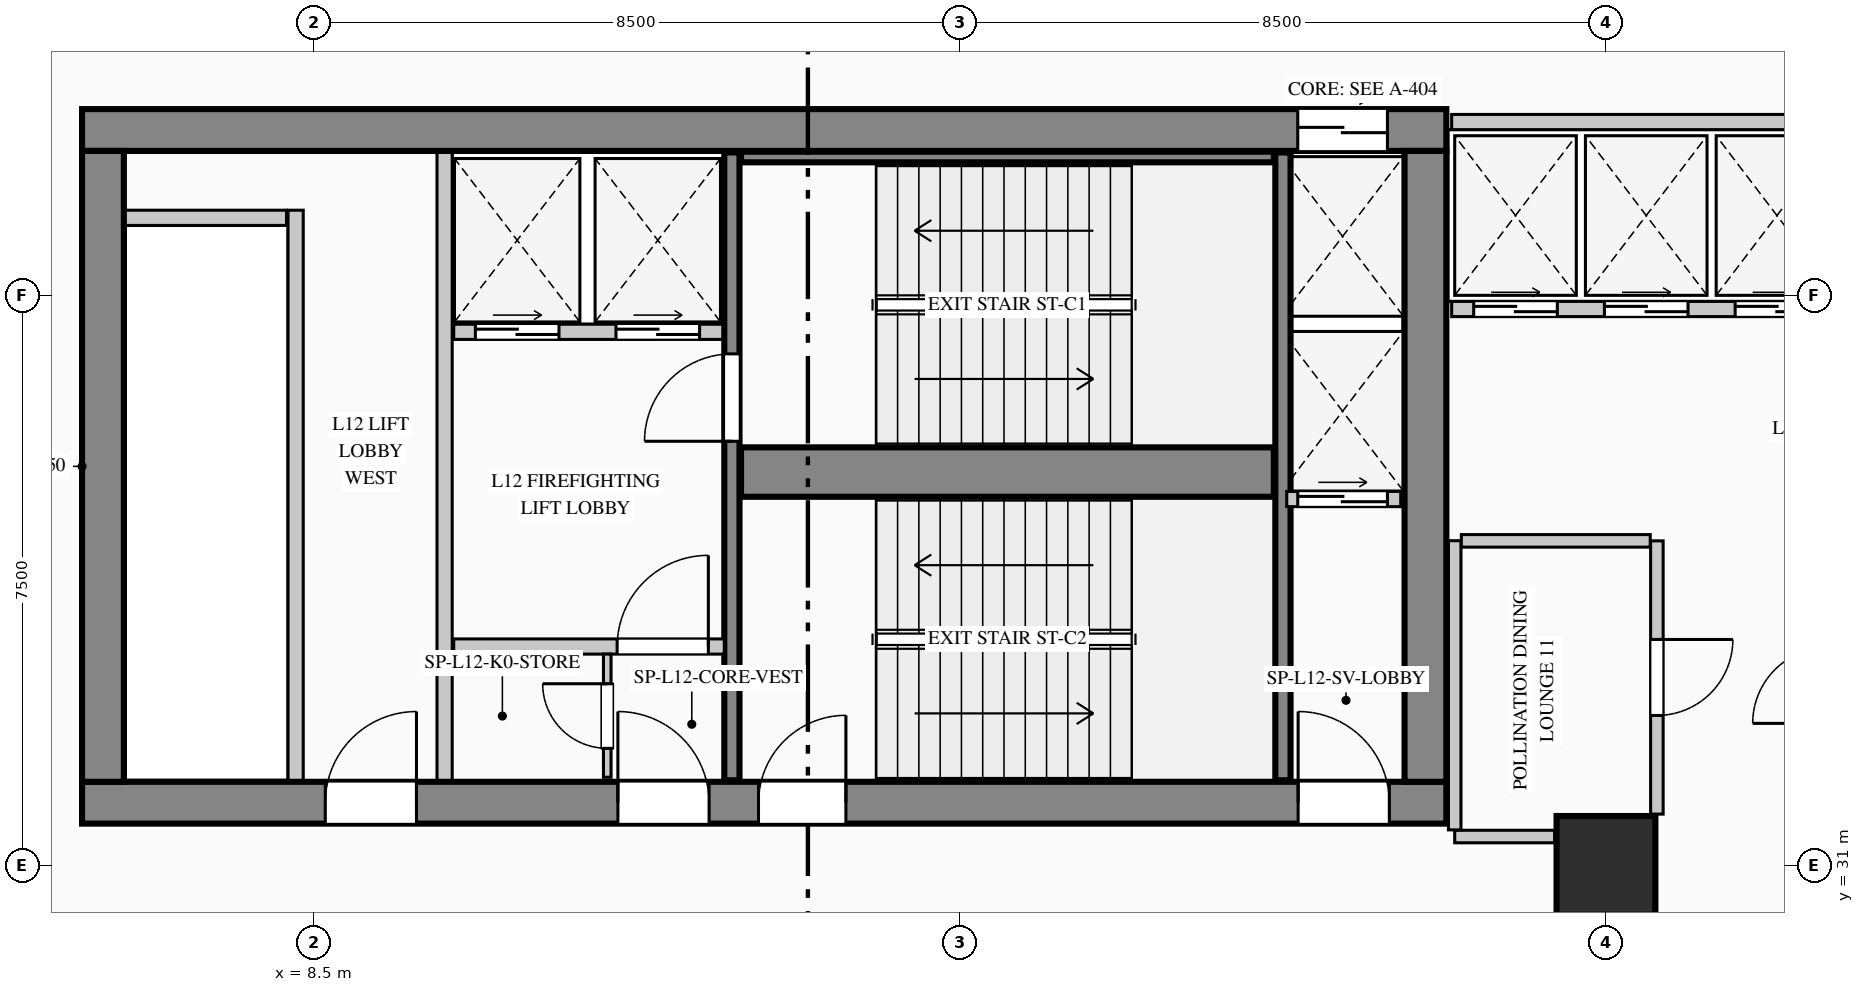
"""IFC4 building model, lengths in metres.
Left out: names, types, materials, properties, quantities, classifications, styles, units other than length and angle.
Written with IfcOpenShell. Run it as: python <this file> out.ifc"""

import sys

from ifc_helpers import new_model, si_unit, direction, frame, frame_2d, origin, origin_2d, place, context, subcontext, project, spatial, rectangle, extrude, element, fill, save


model = new_model("IFC4")
c1 = context("Model", 3, precision=1e-05, world=origin(), true_north=direction((0.0, 1.0)))
c2 = subcontext(c1, "Body", "Model", "MODEL_VIEW")
j1 = project(units=[si_unit("LENGTHUNIT", "METRE"), si_unit("PLANEANGLEUNIT", "RADIAN")], contexts=[c1])
p1 = place(None, origin())
s1 = spatial("IfcSite", under=j1, at=p1, CompositionType="ELEMENT")
p2 = place(p1, origin())
s2 = spatial("IfcBuilding", under=s1, at=p2, CompositionType="ELEMENT")
p3 = place(p2, frame((0.0, 0.0, 53.4)))
s3 = spatial("IfcBuildingStorey", under=s2, at=p3, CompositionType="ELEMENT", Elevation=53.4)
p4 = place(p3, frame((5.45, 40.675, 0.0), z_axis=(0.0, 0.0, 1.0), x_axis=(1.0, 0.0, 0.0)))
e1 = element("IfcWall", 1, at=p4, inside=s3, PredefinedType="SHEAR", context=c2, shape_type="SweptSolid", body=[
    extrude(rectangle(XDim=17.95, YDim=0.55, at=frame_2d((8.975, 0.0))), origin(), (0.0, 0.0, 1.0), 4.4),
])
p5 = place(p4, frame((15.995, 0.0, 0.0)))
e2 = element("IfcOpeningElement", 2, at=p5, cuts=e1, PredefinedType="OPENING", context=c2, shape_type="SweptSolid", body=[
    extrude(rectangle(XDim=1.18, YDim=2.25, at=frame_2d((0.59, 1.125))), frame((0.0, 0.285, 0.0), z_axis=(0.0, -1.0, 0.0), x_axis=(1.0, 0.0, 0.0)), (0.0, 0.0, 1.0), 0.57),
])
p6 = place(p3, frame((5.45, 31.825, 0.0), z_axis=(0.0, 0.0, 1.0), x_axis=(1.0, 0.0, 0.0)))
e3 = element("IfcWall", 3, at=p6, inside=s3, PredefinedType="SHEAR", context=c2, shape_type="SweptSolid", body=[
    extrude(rectangle(XDim=17.95, YDim=0.55, at=frame_2d((8.975, 0.0))), origin(), (0.0, 0.0, 1.0), 4.4),
])
p7 = place(p6, frame((3.2, 0.0, 0.0)))
e4 = element("IfcOpeningElement", 4, at=p7, cuts=e3, PredefinedType="OPENING", context=c2, shape_type="SweptSolid", body=[
    extrude(rectangle(XDim=1.2, YDim=2.2, at=frame_2d((0.6, 1.1))), frame((0.0, 0.285, 0.0), z_axis=(0.0, -1.0, 0.0), x_axis=(1.0, 0.0, 0.0)), (0.0, 0.0, 1.0), 0.57),
])
p8 = place(p6, frame((7.05, 0.0, 0.0)))
e5 = element("IfcOpeningElement", 5, at=p8, cuts=e3, PredefinedType="OPENING", context=c2, shape_type="SweptSolid", body=[
    extrude(rectangle(XDim=1.2, YDim=2.2, at=frame_2d((0.6, 1.1))), frame((0.0, 0.285, 0.0), z_axis=(0.0, -1.0, 0.0), x_axis=(1.0, 0.0, 0.0)), (0.0, 0.0, 1.0), 0.57),
])
p9 = place(p6, frame((8.9, 0.0, 0.0)))
e6 = element("IfcOpeningElement", 6, at=p9, cuts=e3, PredefinedType="OPENING", context=c2, shape_type="SweptSolid", body=[
    extrude(rectangle(XDim=1.15, YDim=2.2, at=frame_2d((0.575, 1.1))), frame((0.0, 0.285, 0.0), z_axis=(0.0, -1.0, 0.0), x_axis=(1.0, 0.0, 0.0)), (0.0, 0.0, 1.0), 0.57),
])
p10 = place(p6, frame((16.0, 0.0, 0.0)))
e7 = element("IfcOpeningElement", 7, at=p10, cuts=e3, PredefinedType="OPENING", context=c2, shape_type="SweptSolid", body=[
    extrude(rectangle(XDim=1.2, YDim=2.2, at=frame_2d((0.6, 1.1))), frame((0.0, 0.285, 0.0), z_axis=(0.0, -1.0, 0.0), x_axis=(1.0, 0.0, 0.0)), (0.0, 0.0, 1.0), 0.57),
])
for number, where, z_axis, x_axis in (
    (8, (5.725, 32.1, 0.0), (0.0, 0.0, 1.0), (0.0, 1.0, 0.0)),
    (9, (23.125, 32.1, 0.0), (0.0, 0.0, 1.0), (0.0, 1.0, 0.0)),
):
    element("IfcWall", number, at=place(p3, frame(where, z_axis=z_axis, x_axis=x_axis)), inside=s3, PredefinedType="SHEAR", context=c2, shape_type="SweptSolid", body=[
        extrude(rectangle(XDim=8.3, YDim=0.55, at=frame_2d((4.15, 0.0))), origin(), (0.0, 0.0, 1.0), 4.4),
    ])
p11 = place(p3, frame((14.0, 32.12, 0.0), z_axis=(0.0, 0.0, 1.0), x_axis=(0.0, 1.0, 0.0)))
e10 = element("IfcWall", 10, at=p11, inside=s3, PredefinedType="SHEAR", context=c2, shape_type="SweptSolid", body=[
    extrude(rectangle(XDim=8.26, YDim=0.2, at=frame_2d((4.13, 0.0))), origin(), (0.0, 0.0, 1.0), 4.4),
])
p12 = place(p11, frame((4.46, 0.0, 0.0)))
e11 = element("IfcOpeningElement", 11, at=p12, cuts=e10, PredefinedType="OPENING", context=c2, shape_type="SweptSolid", body=[
    extrude(rectangle(XDim=1.15, YDim=2.2, at=frame_2d((0.575, 1.1))), frame((0.0, 0.11, 0.0), z_axis=(0.0, -1.0, 0.0), x_axis=(1.0, 0.0, 0.0)), (0.0, 0.0, 1.0), 0.22),
])
p13 = place(p3, frame((14.12, 36.175, 0.0), z_axis=(0.0, 0.0, 1.0), x_axis=(1.0, 0.0, 0.0)))
e12 = element("IfcWall", 12, at=p13, inside=s3, PredefinedType="SHEAR", context=c2, shape_type="SweptSolid", body=[
    extrude(rectangle(XDim=7.01, YDim=0.65, at=frame_2d((3.505, 0.0))), origin(), (0.0, 0.0, 1.0), 4.4),
])
p14 = place(p3, frame((21.25, 32.12, 0.0), z_axis=(0.0, 0.0, 1.0), x_axis=(0.0, 1.0, 0.0)))
e13 = element("IfcWall", 13, at=p14, inside=s3, PredefinedType="SHEAR", context=c2, shape_type="SweptSolid", body=[
    extrude(rectangle(XDim=8.26, YDim=0.2, at=frame_2d((4.13, 0.0))), origin(), (0.0, 0.0, 1.0), 4.4),
])
p15 = place(p3, frame((14.12, 40.32, 0.0), z_axis=(0.0, 0.0, 1.0), x_axis=(1.0, 0.0, 0.0)))
e14 = element("IfcWall", 14, at=p15, inside=s3, PredefinedType="SHEAR", context=c2, shape_type="SweptSolid", body=[
    extrude(rectangle(XDim=7.01, YDim=0.14, at=frame_2d((3.505, 0.0))), origin(), (0.0, 0.0, 1.0), 4.4),
])
p16 = place(p3, frame((25.5, 31.0, 0.0), z_axis=(0.0, 0.0, 1.0), x_axis=(1.0, 0.0, 0.0)))
e15 = element("IfcColumn", 15, at=p16, inside=s3, PredefinedType="COLUMN", context=c2, shape_type="SweptSolid", body=[
    extrude(rectangle(XDim=1.3, YDim=1.3, at=origin_2d()), origin(), (0.0, 0.0, 1.0), 4.4),
])
p17 = place(p3, frame((8.523, 4.84, 0.0), z_axis=(0.0, 0.0, 1.0), x_axis=(-0.150394554312, 0.988626055712, 0.0)))
e16 = element("IfcWall", 16, at=p17, inside=s3, PredefinedType="STANDARD", context=c2, shape_type="SweptSolid", body=[
    extrude(rectangle(XDim=36.738, YDim=0.28, at=frame_2d((18.369, 0.0))), origin(), (0.0, 0.0, 1.0), 4.1),
])
p18 = place(p17, frame((22.762, 0.0, 0.9)))
e17 = element("IfcOpeningElement", 17, at=p18, cuts=e16, PredefinedType="OPENING", context=c2, shape_type="SweptSolid", body=[
    extrude(rectangle(XDim=1.5, YDim=1.8, at=frame_2d((0.75, 0.9))), frame((0.0, 0.15, 0.0), z_axis=(0.0, -1.0, 0.0), x_axis=(1.0, 0.0, 0.0)), (0.0, 0.0, 1.0), 0.3),
])
p19 = place(p3, frame((8.26, 32.12, 0.0), z_axis=(0.0, 0.0, 1.0), x_axis=(0.0, 1.0, 0.0)))
e18 = element("IfcWall", 18, at=p19, inside=s3, PredefinedType="PARTITIONING", context=c2, shape_type="SweptSolid", body=[
    extrude(rectangle(XDim=7.5, YDim=0.2, at=frame_2d((3.75, 0.0))), origin(), (0.0, 0.0, 1.0), 4.1),
])
p20 = place(p3, frame((6.02, 39.52, 0.0), z_axis=(0.0, 0.0, 1.0), x_axis=(1.0, 0.0, 0.0)))
e19 = element("IfcWall", 19, at=p20, inside=s3, PredefinedType="PARTITIONING", context=c2, shape_type="SweptSolid", body=[
    extrude(rectangle(XDim=2.12, YDim=0.2, at=frame_2d((1.06, 0.0))), origin(), (0.0, 0.0, 1.0), 4.1),
])
p21 = place(p3, frame((10.22, 32.12, 0.0), z_axis=(0.0, 0.0, 1.0), x_axis=(0.0, 1.0, 0.0)))
e20 = element("IfcWall", 20, at=p21, inside=s3, PredefinedType="PARTITIONING", context=c2, shape_type="SweptSolid", body=[
    extrude(rectangle(XDim=8.26, YDim=0.2, at=frame_2d((4.13, 0.0))), origin(), (0.0, 0.0, 1.0), 4.1),
])
p22 = place(p3, frame((10.34, 38.02, 0.0), z_axis=(0.0, 0.0, 1.0), x_axis=(1.0, 0.0, 0.0)))
e21 = element("IfcWall", 21, at=p22, inside=s3, PredefinedType="PARTITIONING", context=c2, shape_type="SweptSolid", body=[
    extrude(rectangle(XDim=3.54, YDim=0.2, at=frame_2d((1.77, 0.0))), origin(), (0.0, 0.0, 1.0), 4.1),
])
p23 = place(p22, frame((0.285, 0.0, 0.0)))
e22 = element("IfcOpeningElement", 22, at=p23, cuts=e21, PredefinedType="OPENING", context=c2, shape_type="SweptSolid", body=[
    extrude(rectangle(XDim=1.1, YDim=2.2, at=frame_2d((0.55, 1.1))), frame((0.0, 0.11, 0.0), z_axis=(0.0, -1.0, 0.0), x_axis=(1.0, 0.0, 0.0)), (0.0, 0.0, 1.0), 0.22),
])
p24 = place(p22, frame((2.135, 0.0, 0.0)))
e23 = element("IfcOpeningElement", 23, at=p24, cuts=e21, PredefinedType="OPENING", context=c2, shape_type="SweptSolid", body=[
    extrude(rectangle(XDim=1.1, YDim=2.2, at=frame_2d((0.55, 1.1))), frame((0.0, 0.11, 0.0), z_axis=(0.0, -1.0, 0.0), x_axis=(1.0, 0.0, 0.0)), (0.0, 0.0, 1.0), 0.22),
])
p25 = place(p3, frame((10.34, 33.88, 0.0), z_axis=(0.0, 0.0, 1.0), x_axis=(1.0, 0.0, 0.0)))
e24 = element("IfcWall", 24, at=p25, inside=s3, PredefinedType="PARTITIONING", context=c2, shape_type="SweptSolid", body=[
    extrude(rectangle(XDim=3.56, YDim=0.2, at=frame_2d((1.78, 0.0))), origin(), (0.0, 0.0, 1.0), 4.1),
])
p26 = place(p25, frame((2.15, 0.0, 0.0)))
e25 = element("IfcOpeningElement", 25, at=p26, cuts=e24, PredefinedType="OPENING", context=c2, shape_type="SweptSolid", body=[
    extrude(rectangle(XDim=1.2, YDim=2.2, at=frame_2d((0.6, 1.1))), frame((0.0, 0.11, 0.0), z_axis=(0.0, -1.0, 0.0), x_axis=(1.0, 0.0, 0.0)), (0.0, 0.0, 1.0), 0.22),
])
p27 = place(p3, frame((12.36, 32.16, 0.0), z_axis=(0.0, 0.0, 1.0), x_axis=(0.0, 1.0, 0.0)))
e26 = element("IfcWall", 26, at=p27, inside=s3, PredefinedType="PARTITIONING", context=c2, shape_type="SweptSolid", body=[
    extrude(rectangle(XDim=1.62, YDim=0.1, at=frame_2d((0.81, 0.0))), origin(), (0.0, 0.0, 1.0), 4.1),
])
p28 = place(p27, frame((0.38, 0.0, 0.0)))
e27 = element("IfcOpeningElement", 27, at=p28, cuts=e26, PredefinedType="OPENING", context=c2, shape_type="SweptSolid", body=[
    extrude(rectangle(XDim=0.85, YDim=2.1, at=frame_2d((0.425, 1.05))), frame((0.0, 0.06, 0.0), z_axis=(0.0, -1.0, 0.0), x_axis=(1.0, 0.0, 0.0)), (0.0, 0.0, 1.0), 0.12),
])
p29 = place(p3, frame((21.3, 35.82, 0.0), z_axis=(0.0, 0.0, 1.0), x_axis=(1.0, 0.0, 0.0)))
e28 = element("IfcWall", 28, at=p29, inside=s3, PredefinedType="PARTITIONING", context=c2, shape_type="SweptSolid", body=[
    extrude(rectangle(XDim=1.5, YDim=0.2, at=frame_2d((0.75, 0.0))), origin(), (0.0, 0.0, 1.0), 4.1),
])
p30 = place(p29, frame((0.145, 0.0, 0.0)))
e29 = element("IfcOpeningElement", 29, at=p30, cuts=e28, PredefinedType="OPENING", context=c2, shape_type="SweptSolid", body=[
    extrude(rectangle(XDim=1.18, YDim=2.25, at=frame_2d((0.59, 1.125))), frame((0.0, 0.11, 0.0), z_axis=(0.0, -1.0, 0.0), x_axis=(1.0, 0.0, 0.0)), (0.0, 0.0, 1.0), 0.22),
])
p31 = place(p3, frame((23.47, 40.78, 0.0), z_axis=(0.0, 0.0, 1.0), x_axis=(1.0, 0.0, 0.0)))
e30 = element("IfcWall", 30, at=p31, inside=s3, PredefinedType="PARTITIONING", context=c2, shape_type="SweptSolid", body=[
    extrude(rectangle(XDim=6.91, YDim=0.2, at=frame_2d((3.455, 0.0))), origin(), (0.0, 0.0, 1.0), 4.1),
])
p32 = place(p3, frame((23.47, 38.32, 0.0), z_axis=(0.0, 0.0, 1.0), x_axis=(1.0, 0.0, 0.0)))
e31 = element("IfcWall", 31, at=p32, inside=s3, PredefinedType="PARTITIONING", context=c2, shape_type="SweptSolid", body=[
    extrude(rectangle(XDim=6.79, YDim=0.2, at=frame_2d((3.395, 0.0))), origin(), (0.0, 0.0, 1.0), 4.1),
])
p33 = place(p32, frame((0.29, 0.0, 0.0)))
e32 = element("IfcOpeningElement", 32, at=p33, cuts=e31, PredefinedType="OPENING", context=c2, shape_type="SweptSolid", body=[
    extrude(rectangle(XDim=1.1, YDim=2.2, at=frame_2d((0.55, 1.1))), frame((0.0, 0.11, 0.0), z_axis=(0.0, -1.0, 0.0), x_axis=(1.0, 0.0, 0.0)), (0.0, 0.0, 1.0), 0.22),
])
p34 = place(p32, frame((2.01, 0.0, 0.0)))
e33 = element("IfcOpeningElement", 33, at=p34, cuts=e31, PredefinedType="OPENING", context=c2, shape_type="SweptSolid", body=[
    extrude(rectangle(XDim=1.1, YDim=2.2, at=frame_2d((0.55, 1.1))), frame((0.0, 0.11, 0.0), z_axis=(0.0, -1.0, 0.0), x_axis=(1.0, 0.0, 0.0)), (0.0, 0.0, 1.0), 0.22),
])
p35 = place(p32, frame((3.73, 0.0, 0.0)))
e34 = element("IfcOpeningElement", 34, at=p35, cuts=e31, PredefinedType="OPENING", context=c2, shape_type="SweptSolid", body=[
    extrude(rectangle(XDim=1.1, YDim=2.2, at=frame_2d((0.55, 1.1))), frame((0.0, 0.11, 0.0), z_axis=(0.0, -1.0, 0.0), x_axis=(1.0, 0.0, 0.0)), (0.0, 0.0, 1.0), 0.22),
])
p36 = place(p32, frame((5.45, 0.0, 0.0)))
e35 = element("IfcOpeningElement", 35, at=p36, cuts=e31, PredefinedType="OPENING", context=c2, shape_type="SweptSolid", body=[
    extrude(rectangle(XDim=1.1, YDim=2.2, at=frame_2d((0.55, 1.1))), frame((0.0, 0.11, 0.0), z_axis=(0.0, -1.0, 0.0), x_axis=(1.0, 0.0, 0.0)), (0.0, 0.0, 1.0), 0.22),
])
p37 = place(p3, frame((26.17, 35.27, 0.0), z_axis=(0.0, 0.0, 1.0), x_axis=(0.0, -1.0, 0.0)))
e36 = element("IfcWall", 36, at=p37, inside=s3, PredefinedType="PARTITIONING", context=c2, shape_type="SweptSolid", body=[
    extrude(rectangle(XDim=3.595, YDim=0.165, at=frame_2d((1.797, 0.0))), origin(), (0.0, 0.0, 1.0), 4.1),
])
p38 = place(p37, frame((1.298, 0.0, 0.0)))
e37 = element("IfcOpeningElement", 37, at=p38, cuts=e36, PredefinedType="OPENING", context=c2, shape_type="SweptSolid", body=[
    extrude(rectangle(XDim=1.0, YDim=2.15, at=frame_2d((0.5, 1.075))), frame((0.0, 0.093, 0.0), z_axis=(0.0, -1.0, 0.0), x_axis=(1.0, 0.0, 0.0)), (0.0, 0.0, 1.0), 0.185),
])
p39 = place(p3, frame((24.825, 31.38, 0.0), z_axis=(0.0, 0.0, 1.0), x_axis=(-1.0, 0.0, 0.0)))
e38 = element("IfcWall", 38, at=p39, inside=s3, PredefinedType="PARTITIONING", context=c2, shape_type="SweptSolid", body=[
    extrude(rectangle(XDim=1.315, YDim=0.165, at=frame_2d((0.657, 0.0))), origin(), (0.0, 0.0, 1.0), 4.1),
])
p40 = place(p3, frame((23.51, 31.468, 0.0), z_axis=(0.0, 0.0, 1.0), x_axis=(0.0, 1.0, 0.0)))
e39 = element("IfcWall", 39, at=p40, inside=s3, PredefinedType="PARTITIONING", context=c2, shape_type="SweptSolid", body=[
    extrude(rectangle(XDim=3.804, YDim=0.165, at=frame_2d((1.902, 0.0))), origin(), (0.0, 0.0, 1.0), 4.1),
])
p41 = place(p3, frame((23.597, 35.27, 0.0), z_axis=(0.0, 0.0, 1.0), x_axis=(1.0, 0.0, 0.0)))
e40 = element("IfcWall", 40, at=p41, inside=s3, PredefinedType="PARTITIONING", context=c2, shape_type="SweptSolid", body=[
    extrude(rectangle(XDim=2.485, YDim=0.165, at=frame_2d((1.243, 0.0))), origin(), (0.0, 0.0, 1.0), 4.1),
])
p42 = place(p7, origin())
e41 = element("IfcDoor", 41, at=p42, inside=s3, OperationType="SINGLE_SWING_RIGHT", PredefinedType="DOOR", context=c2, shape_type="SweptSolid", body=[
    extrude(rectangle(XDim=1.2, YDim=2.2, at=frame_2d((0.6, 1.1))), frame((0.0, 0.025, 0.0), z_axis=(0.0, -1.0, 0.0), x_axis=(1.0, 0.0, 0.0)), (0.0, 0.0, 1.0), 0.05),
])
fill(e4, e41)
p43 = place(p8, origin())
e42 = element("IfcDoor", 42, at=p43, inside=s3, OperationType="SINGLE_SWING_LEFT", PredefinedType="DOOR", context=c2, shape_type="SweptSolid", body=[
    extrude(rectangle(XDim=1.2, YDim=2.2, at=frame_2d((0.6, 1.1))), frame((0.0, 0.025, 0.0), z_axis=(0.0, -1.0, 0.0), x_axis=(1.0, 0.0, 0.0)), (0.0, 0.0, 1.0), 0.05),
])
fill(e5, e42)
p44 = place(p9, origin())
e43 = element("IfcDoor", 43, at=p44, inside=s3, OperationType="SINGLE_SWING_RIGHT", PredefinedType="DOOR", context=c2, shape_type="SweptSolid", body=[
    extrude(rectangle(XDim=1.15, YDim=2.2, at=frame_2d((0.575, 1.1))), frame((0.0, 0.025, 0.0), z_axis=(0.0, -1.0, 0.0), x_axis=(1.0, 0.0, 0.0)), (0.0, 0.0, 1.0), 0.05),
])
fill(e6, e43)
p45 = place(p10, origin())
e44 = element("IfcDoor", 44, at=p45, inside=s3, OperationType="SINGLE_SWING_LEFT", PredefinedType="DOOR", context=c2, shape_type="SweptSolid", body=[
    extrude(rectangle(XDim=1.2, YDim=2.2, at=frame_2d((0.6, 1.1))), frame((0.0, 0.025, 0.0), z_axis=(0.0, -1.0, 0.0), x_axis=(1.0, 0.0, 0.0)), (0.0, 0.0, 1.0), 0.05),
])
fill(e7, e44)
p46 = place(p26, origin())
e45 = element("IfcDoor", 45, at=p46, inside=s3, OperationType="SINGLE_SWING_RIGHT", PredefinedType="DOOR", context=c2, shape_type="SweptSolid", body=[
    extrude(rectangle(XDim=1.2, YDim=2.2, at=frame_2d((0.6, 1.1))), frame((0.0, 0.025, 0.0), z_axis=(0.0, -1.0, 0.0), x_axis=(1.0, 0.0, 0.0)), (0.0, 0.0, 1.0), 0.05),
])
fill(e25, e45)
p47 = place(p28, origin())
e46 = element("IfcDoor", 46, at=p47, inside=s3, OperationType="SINGLE_SWING_RIGHT", PredefinedType="DOOR", context=c2, shape_type="SweptSolid", body=[
    extrude(rectangle(XDim=0.85, YDim=2.1, at=frame_2d((0.425, 1.05))), frame((0.0, 0.025, 0.0), z_axis=(0.0, -1.0, 0.0), x_axis=(1.0, 0.0, 0.0)), (0.0, 0.0, 1.0), 0.05),
])
fill(e27, e46)
p48 = place(p12, origin())
e47 = element("IfcDoor", 47, at=p48, inside=s3, OperationType="SINGLE_SWING_LEFT", PredefinedType="DOOR", context=c2, shape_type="SweptSolid", body=[
    extrude(rectangle(XDim=1.15, YDim=2.2, at=frame_2d((0.575, 1.1))), frame((0.0, 0.025, 0.0), z_axis=(0.0, -1.0, 0.0), x_axis=(1.0, 0.0, 0.0)), (0.0, 0.0, 1.0), 0.05),
])
fill(e11, e47)
p49 = place(p23, origin())
e48 = element("IfcDoor", 48, at=p49, inside=s3, OperationType="DOUBLE_DOOR_SLIDING", PredefinedType="DOOR", context=c2, shape_type="SweptSolid", body=[
    extrude(rectangle(XDim=1.1, YDim=2.2, at=frame_2d((0.55, 1.1))), frame((0.0, 0.025, 0.0), z_axis=(0.0, -1.0, 0.0), x_axis=(1.0, 0.0, 0.0)), (0.0, 0.0, 1.0), 0.05),
])
fill(e22, e48)
p50 = place(p24, origin())
e49 = element("IfcDoor", 49, at=p50, inside=s3, OperationType="DOUBLE_DOOR_SLIDING", PredefinedType="DOOR", context=c2, shape_type="SweptSolid", body=[
    extrude(rectangle(XDim=1.1, YDim=2.2, at=frame_2d((0.55, 1.1))), frame((0.0, 0.025, 0.0), z_axis=(0.0, -1.0, 0.0), x_axis=(1.0, 0.0, 0.0)), (0.0, 0.0, 1.0), 0.05),
])
fill(e23, e49)
p51 = place(p5, origin())
e50 = element("IfcDoor", 50, at=p51, inside=s3, OperationType="DOUBLE_DOOR_SLIDING", PredefinedType="DOOR", context=c2, shape_type="SweptSolid", body=[
    extrude(rectangle(XDim=1.18, YDim=2.25, at=frame_2d((0.59, 1.125))), frame((0.0, 0.025, 0.0), z_axis=(0.0, -1.0, 0.0), x_axis=(1.0, 0.0, 0.0)), (0.0, 0.0, 1.0), 0.05),
])
fill(e2, e50)
p52 = place(p30, origin())
e51 = element("IfcDoor", 51, at=p52, inside=s3, OperationType="DOUBLE_DOOR_SLIDING", PredefinedType="DOOR", context=c2, shape_type="SweptSolid", body=[
    extrude(rectangle(XDim=1.18, YDim=2.25, at=frame_2d((0.59, 1.125))), frame((0.0, 0.025, 0.0), z_axis=(0.0, -1.0, 0.0), x_axis=(1.0, 0.0, 0.0)), (0.0, 0.0, 1.0), 0.05),
])
fill(e29, e51)
p53 = place(p33, origin())
e52 = element("IfcDoor", 52, at=p53, inside=s3, OperationType="DOUBLE_DOOR_SLIDING", PredefinedType="DOOR", context=c2, shape_type="SweptSolid", body=[
    extrude(rectangle(XDim=1.1, YDim=2.2, at=frame_2d((0.55, 1.1))), frame((0.0, 0.025, 0.0), z_axis=(0.0, -1.0, 0.0), x_axis=(1.0, 0.0, 0.0)), (0.0, 0.0, 1.0), 0.05),
])
fill(e32, e52)
p54 = place(p34, origin())
e53 = element("IfcDoor", 53, at=p54, inside=s3, OperationType="DOUBLE_DOOR_SLIDING", PredefinedType="DOOR", context=c2, shape_type="SweptSolid", body=[
    extrude(rectangle(XDim=1.1, YDim=2.2, at=frame_2d((0.55, 1.1))), frame((0.0, 0.025, 0.0), z_axis=(0.0, -1.0, 0.0), x_axis=(1.0, 0.0, 0.0)), (0.0, 0.0, 1.0), 0.05),
])
fill(e33, e53)
p55 = place(p35, origin())
e54 = element("IfcDoor", 54, at=p55, inside=s3, OperationType="DOUBLE_DOOR_SLIDING", PredefinedType="DOOR", context=c2, shape_type="SweptSolid", body=[
    extrude(rectangle(XDim=1.1, YDim=2.2, at=frame_2d((0.55, 1.1))), frame((0.0, 0.025, 0.0), z_axis=(0.0, -1.0, 0.0), x_axis=(1.0, 0.0, 0.0)), (0.0, 0.0, 1.0), 0.05),
])
fill(e34, e54)
p56 = place(p38, origin())
e55 = element("IfcDoor", 55, at=p56, inside=s3, OperationType="SINGLE_SWING_LEFT", PredefinedType="DOOR", context=c2, shape_type="SweptSolid", body=[
    extrude(rectangle(XDim=1.0, YDim=2.15, at=frame_2d((0.5, 1.075))), frame((0.0, 0.025, 0.0), z_axis=(0.0, -1.0, 0.0), x_axis=(1.0, 0.0, 0.0)), (0.0, 0.0, 1.0), 0.05),
])
fill(e37, e55)
save(model, sys.argv[1])
